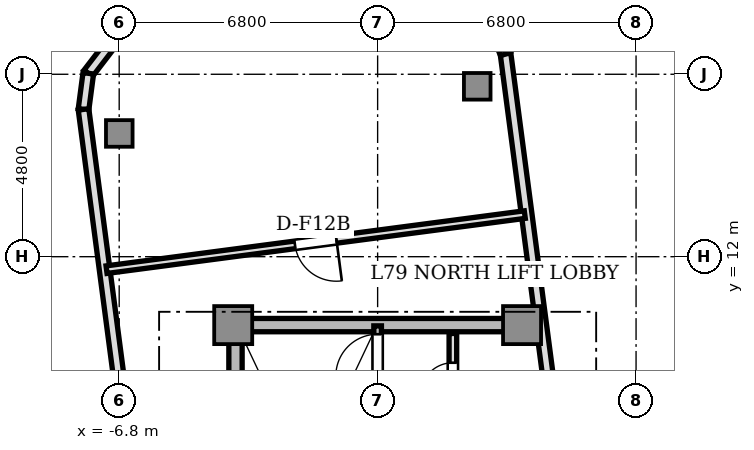
"""IFC4 building model, lengths in metres.
Left out: names, types, materials, properties, quantities, classifications, styles, units other than length and angle.
Written with IfcOpenShell. Run it as: python <this file> out.ifc"""

import sys

from ifc_helpers import new_model, si_unit, direction, frame, frame_2d, origin, origin_2d, place, context, subcontext, project, spatial, rectangle, extrude, source, transform, mapped, element, fill, save


model = new_model("IFC4")
c1 = context("Model", 3, precision=1e-05, world=origin(), true_north=direction((0.0, 1.0)))
c2 = subcontext(c1, "Body", "Model", "MODEL_VIEW")
j1 = project(units=[si_unit("LENGTHUNIT", "METRE"), si_unit("PLANEANGLEUNIT", "RADIAN")], contexts=[c1])
p1 = place(None, origin())
s1 = spatial("IfcSite", under=j1, at=p1, CompositionType="ELEMENT")
p2 = place(p1, origin())
s2 = spatial("IfcBuilding", under=s1, at=p2, CompositionType="ELEMENT")
p3 = place(p2, frame((0.0, 0.0, 285.1)))
s3 = spatial("IfcBuildingStorey", under=s2, at=p3, CompositionType="ELEMENT", Elevation=285.1)
p4 = place(p3, frame((-3.55, 10.2, 0.0), z_axis=(0.0, 0.0, 1.0), x_axis=(1.0, 0.0, 0.0)))
e1 = element("IfcWall", 1, at=p4, inside=s3, PredefinedType="SHEAR", context=c2, shape_type="SweptSolid", body=[
    extrude(rectangle(XDim=7.1, YDim=0.35, at=frame_2d((3.55, 0.0))), origin(), (0.0, 0.0, 1.0), 3.5),
])
p5 = place(p3, frame((-3.74, 2.85, 0.0), z_axis=(0.0, 0.0, 1.0), x_axis=(0.0, 1.0, 0.0)))
e2 = element("IfcWall", 2, at=p5, inside=s3, PredefinedType="SHEAR", context=c2, shape_type="SweptSolid", body=[
    extrude(rectangle(XDim=6.9, YDim=0.35, at=frame_2d((3.45, 0.0))), origin(), (0.0, 0.0, 1.0), 3.5),
])
m1 = source(origin(), c2, "Body", "SweptSolid", [
    extrude(rectangle(XDim=1.0, YDim=1.0, at=origin_2d()), origin(), (0.0, 0.0, 1.0), 3.5),
])
for number, where, z_axis, x_axis in (
    (3, (-3.8, 10.2, 0.0), (0.0, 0.0, 1.0), (1.0, 0.0, 0.0)),
    (4, (3.8, 10.2, 0.0), (0.0, 0.0, 1.0), (1.0, 0.0, 0.0)),
):
    element("IfcColumn", number, at=place(p3, frame(where, z_axis=z_axis, x_axis=x_axis)), inside=s3, PredefinedType="COLUMN", context=c2, shape_type="MappedRepresentation", body=[
        mapped(m1, transform((0.0, 0.0, 0.0), scale=1.0)),
    ])
m2 = source(origin(), c2, "Body", "SweptSolid", [
    extrude(rectangle(XDim=0.7, YDim=0.7, at=origin_2d()), origin(), (0.0, 0.0, 1.0), 3.5),
])
for number, where, z_axis, x_axis in (
    (5, (2.621, 16.483, 0.0), (0.0, 0.0, 1.0), (1.0, 0.0, 0.0)),
    (6, (-6.798, 15.243, 0.0), (0.0, 0.0, 1.0), (1.0, 0.0, 0.0)),
):
    element("IfcColumn", number, at=place(p3, frame(where, z_axis=z_axis, x_axis=x_axis)), inside=s3, PredefinedType="COLUMN", context=c2, shape_type="MappedRepresentation", body=[
        mapped(m2, transform((0.0, 0.0, 0.0), scale=1.0)),
    ])
p6 = place(p3, frame((4.821, 6.283, 0.0), z_axis=(0.0, 0.0, 1.0), x_axis=(-0.130521347626, 0.991445499165, 0.0)))
e7 = element("IfcWall", 7, at=p6, inside=s3, PredefinedType="SOLIDWALL", context=c2, shape_type="SweptSolid", body=[
    extrude(rectangle(XDim=11.15, YDim=0.28, at=frame_2d((5.575, 0.0))), origin(), (0.0, 0.0, 1.0), 3.5),
])
p7 = place(p3, frame((3.366, 17.338, 0.0), z_axis=(0.0, 0.0, 1.0), x_axis=(-0.382659506909, 0.923889442397, 0.0)))
e8 = element("IfcWall", 8, at=p7, inside=s3, PredefinedType="SOLIDWALL", context=c2, shape_type="SweptSolid", body=[
    extrude(rectangle(XDim=0.958, YDim=0.28, at=frame_2d((0.479, 0.0))), origin(), (0.0, 0.0, 1.0), 3.5),
])
p8 = place(p3, frame((-7.031, 17.585, 0.0), z_axis=(0.0, 0.0, 1.0), x_axis=(-0.60861352168, -0.793466811674, 0.0)))
e9 = element("IfcWall", 9, at=p8, inside=s3, PredefinedType="SOLIDWALL", context=c2, shape_type="SweptSolid", body=[
    extrude(rectangle(XDim=0.958, YDim=0.28, at=frame_2d((0.479, 0.0))), origin(), (0.0, 0.0, 1.0), 3.5),
])
p9 = place(p3, frame((-7.613, 16.825, 0.0), z_axis=(0.0, 0.0, 1.0), x_axis=(-0.130527053476, -0.991444747987, 0.0)))
e10 = element("IfcWall", 10, at=p9, inside=s3, PredefinedType="SOLIDWALL", context=c2, shape_type="SweptSolid", body=[
    extrude(rectangle(XDim=0.958, YDim=0.28, at=frame_2d((0.479, 0.0))), origin(), (0.0, 0.0, 1.0), 3.5),
])
p10 = place(p3, frame((-7.738, 15.876, 0.0), z_axis=(0.0, 0.0, 1.0), x_axis=(0.130521347626, -0.991445499165, 0.0)))
e11 = element("IfcWall", 11, at=p10, inside=s3, PredefinedType="SOLIDWALL", context=c2, shape_type="SweptSolid", body=[
    extrude(rectangle(XDim=11.15, YDim=0.28, at=frame_2d((5.575, 0.0))), origin(), (0.0, 0.0, 1.0), 3.5),
])
p11 = place(p3, frame((0.0, 2.5, 0.0), z_axis=(0.0, 0.0, 1.0), x_axis=(0.0, 1.0, 0.0)))
e12 = element("IfcWall", 12, at=p11, inside=s3, PredefinedType="SOLIDWALL", context=c2, shape_type="SweptSolid", body=[
    extrude(rectangle(XDim=7.68, YDim=0.2, at=frame_2d((3.84, 0.0))), origin(), (0.0, 0.0, 1.0), 3.5),
])
p12 = place(p11, frame((6.36, 0.0, 0.0)))
e13 = element("IfcOpeningElement", 13, at=p12, cuts=e12, PredefinedType="OPENING", context=c2, shape_type="SweptSolid", body=[
    extrude(rectangle(XDim=1.1, YDim=2.15, at=frame_2d((0.55, 1.075))), frame((0.0, 0.11, 0.0), z_axis=(0.0, -1.0, 0.0), x_axis=(1.0, 0.0, 0.0)), (0.0, 0.0, 1.0), 0.22),
])
p13 = place(p3, frame((1.98, 5.32, 0.0), z_axis=(0.0, 0.0, 1.0), x_axis=(0.0, 1.0, 0.0)))
e14 = element("IfcWall", 14, at=p13, inside=s3, PredefinedType="SOLIDWALL", context=c2, shape_type="SweptSolid", body=[
    extrude(rectangle(XDim=4.66, YDim=0.2, at=frame_2d((2.33, 0.0))), origin(), (0.0, 0.0, 1.0), 3.05),
])
p14 = place(p13, frame((3.04, 0.0, 0.0)))
e15 = element("IfcOpeningElement", 15, at=p14, cuts=e14, PredefinedType="OPENING", context=c2, shape_type="SweptSolid", body=[
    extrude(rectangle(XDim=0.85, YDim=2.1, at=frame_2d((0.425, 1.05))), frame((0.0, 0.11, 0.0), z_axis=(0.0, -1.0, 0.0), x_axis=(1.0, 0.0, 0.0)), (0.0, 0.0, 1.0), 0.22),
])
p15 = place(p3, frame((3.872, 13.108, 0.0), z_axis=(0.0, 0.0, 1.0), x_axis=(-0.991443437127, -0.130537009991, 0.0)))
e16 = element("IfcWall", 16, at=p15, inside=s3, PredefinedType="SOLIDWALL", context=c2, shape_type="SweptSolid", body=[
    extrude(rectangle(XDim=11.1, YDim=0.2, at=frame_2d((5.55, 0.0))), origin(), (0.0, 0.0, 1.0), 3.05),
])
p16 = place(p15, frame((5.0, 0.0, 0.0)))
e17 = element("IfcOpeningElement", 17, at=p16, cuts=e16, PredefinedType="OPENING", context=c2, shape_type="SweptSolid", body=[
    extrude(rectangle(XDim=1.1, YDim=2.15, at=frame_2d((0.55, 1.075))), frame((0.0, 0.11, 0.0), z_axis=(0.0, -1.0, 0.0), x_axis=(1.0, 0.0, 0.0)), (0.0, 0.0, 1.0), 0.22),
])
m3 = source(origin(), c2, "Body", "SweptSolid", [
    extrude(rectangle(XDim=1.1, YDim=0.05, at=origin_2d()), origin(), (0.0, 0.0, 1.0), 2.15),
])
p17 = place(p12, frame((0.55, 0.0, 0.0)))
e18 = element("IfcDoor", 18, at=p17, inside=s3, OperationType="SINGLE_SWING_LEFT", PredefinedType="DOOR", context=c2, shape_type="MappedRepresentation", body=[
    mapped(m3, transform((0.0, 0.0, 0.0), scale=1.0)),
])
fill(e13, e18)
m4 = source(origin(), c2, "Body", "SweptSolid", [
    extrude(rectangle(XDim=0.85, YDim=0.05, at=origin_2d()), origin(), (0.0, 0.0, 1.0), 2.1),
])
p18 = place(p14, frame((0.425, 0.0, 0.0)))
e19 = element("IfcDoor", 19, at=p18, inside=s3, OperationType="SINGLE_SWING_LEFT", PredefinedType="DOOR", context=c2, shape_type="MappedRepresentation", body=[
    mapped(m4, transform((0.0, 0.0, 0.0), scale=1.0)),
])
fill(e15, e19)
p19 = place(p16, frame((0.55, 0.0, 0.0)))
e20 = element("IfcDoor", 20, at=p19, inside=s3, OperationType="SINGLE_SWING_LEFT", PredefinedType="DOOR", context=c2, shape_type="MappedRepresentation", body=[
    mapped(m3, transform((0.0, 0.0, 0.0), scale=1.0)),
])
fill(e17, e20)
save(model, sys.argv[1])
